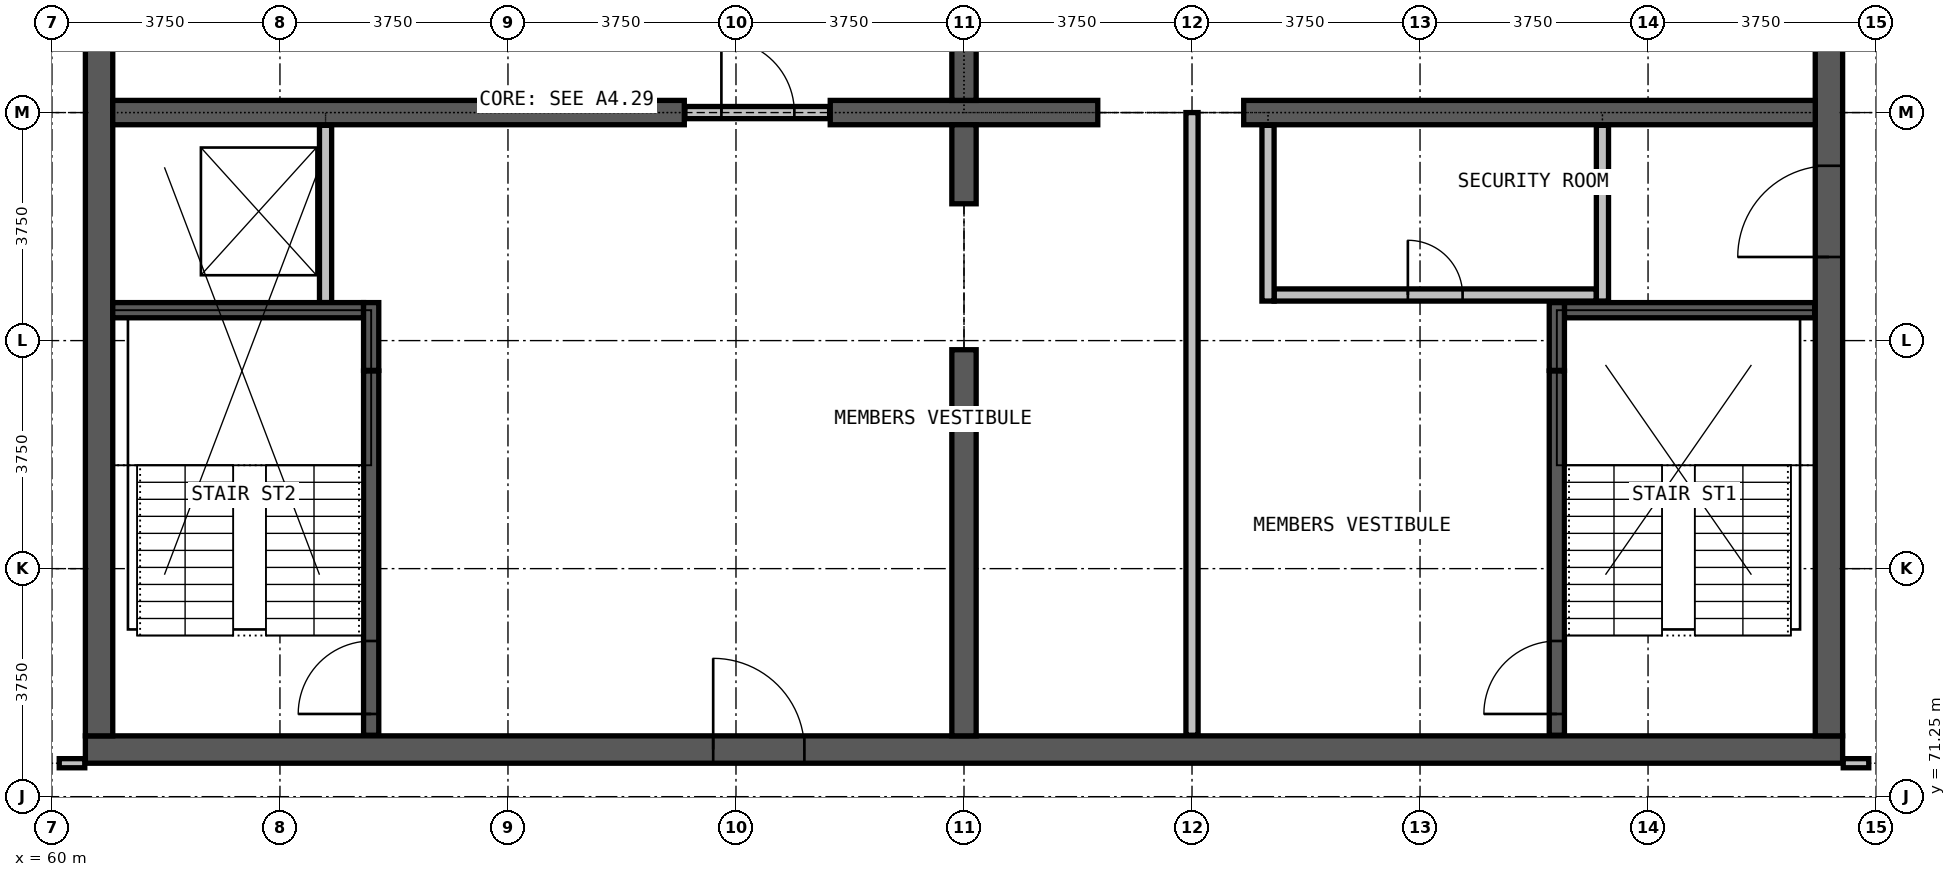
"""IFC4 building model, lengths in metres.
Left out: names, types, materials, properties, quantities, classifications, styles, units other than length and angle.
Written with IfcOpenShell. Run it as: python <this file> out.ifc"""

import sys

from ifc_helpers import new_model, si_unit, direction, frame, frame_2d, origin, place, context, subcontext, project, spatial, rectangle, extrude, element, fill, save


model = new_model("IFC4")
c1 = context("Model", 3, precision=1e-05, world=origin(), true_north=direction((0.0, 1.0)))
c2 = subcontext(c1, "Body", "Model", "MODEL_VIEW")
j1 = project(units=[si_unit("LENGTHUNIT", "METRE"), si_unit("PLANEANGLEUNIT", "RADIAN")], contexts=[c1])
p1 = place(None, origin())
s1 = spatial("IfcSite", under=j1, at=p1, CompositionType="ELEMENT")
p2 = place(p1, origin())
s2 = spatial("IfcBuilding", under=s1, at=p2, CompositionType="ELEMENT")
p3 = place(p2, frame((0.0, 0.0, 272.9)))
s3 = spatial("IfcBuildingStorey", under=s2, at=p3, CompositionType="ELEMENT", Elevation=272.9)
p4 = place(p3, frame((60.55, 72.025, 0.0), z_axis=(0.0, 0.0, 1.0), x_axis=(1.0, 0.0, 0.0)))
e1 = element("IfcWall", 1, at=p4, inside=s3, PredefinedType="SHEAR", context=c2, shape_type="SweptSolid", body=[
    extrude(rectangle(XDim=28.9, YDim=0.45, at=frame_2d((14.45, 0.0))), origin(), (0.0, 0.0, 1.0), 3.6),
])
p5 = place(p4, frame((10.325, 0.0, 0.0)))
e2 = element("IfcOpeningElement", 2, at=p5, cuts=e1, PredefinedType="OPENING", context=c2, shape_type="SweptSolid", body=[
    extrude(rectangle(XDim=1.5, YDim=2.2, at=frame_2d((0.75, 1.1))), frame((0.0, 0.235, 0.0), z_axis=(0.0, -1.0, 0.0), x_axis=(1.0, 0.0, 0.0)), (0.0, 0.0, 1.0), 0.47),
])
p6 = place(p3, frame((89.225, 72.25, 0.0), z_axis=(0.0, 0.0, 1.0), x_axis=(0.0, 1.0, 0.0)))
e3 = element("IfcWall", 3, at=p6, inside=s3, PredefinedType="SHEAR", context=c2, shape_type="SweptSolid", body=[
    extrude(rectangle(XDim=20.5, YDim=0.45, at=frame_2d((10.25, 0.0))), origin(), (0.0, 0.0, 1.0), 3.6),
])
p7 = place(p6, frame((7.875, 0.0, 0.0)))
e4 = element("IfcOpeningElement", 4, at=p7, cuts=e3, PredefinedType="OPENING", context=c2, shape_type="SweptSolid", body=[
    extrude(rectangle(XDim=1.5, YDim=2.2, at=frame_2d((0.75, 1.1))), frame((0.0, 0.235, 0.0), z_axis=(0.0, -1.0, 0.0), x_axis=(1.0, 0.0, 0.0)), (0.0, 0.0, 1.0), 0.47),
])
p8 = place(p3, frame((60.775, 92.75, 0.0), z_axis=(0.0, 0.0, 1.0), x_axis=(0.0, -1.0, 0.0)))
e5 = element("IfcWall", 5, at=p8, inside=s3, PredefinedType="SHEAR", context=c2, shape_type="SweptSolid", body=[
    extrude(rectangle(XDim=20.5, YDim=0.45, at=frame_2d((10.25, 0.0))), origin(), (0.0, 0.0, 1.0), 3.6),
])
p9 = place(p8, frame((8.025, 0.0, 0.0)))
e6 = element("IfcOpeningElement", 6, at=p9, cuts=e5, PredefinedType="OPENING", context=c2, shape_type="SweptSolid", body=[
    extrude(rectangle(XDim=1.2, YDim=2.2, at=frame_2d((0.6, 1.1))), frame((0.0, 0.235, 0.0), z_axis=(0.0, -1.0, 0.0), x_axis=(1.0, 0.0, 0.0)), (0.0, 0.0, 1.0), 0.47),
])
p10 = place(p3, frame((61.0, 82.5, 0.0), z_axis=(0.0, 0.0, 1.0), x_axis=(1.0, 0.0, 0.0)))
e7 = element("IfcWall", 7, at=p10, inside=s3, PredefinedType="SHEAR", context=c2, shape_type="SweptSolid", body=[
    extrude(rectangle(XDim=9.4, YDim=0.4, at=frame_2d((4.7, 0.0))), origin(), (0.0, 0.0, 1.0), 3.6),
])
p11 = place(p3, frame((72.8, 82.5, 0.0), z_axis=(0.0, 0.0, 1.0), x_axis=(1.0, 0.0, 0.0)))
e8 = element("IfcWall", 8, at=p11, inside=s3, PredefinedType="SHEAR", context=c2, shape_type="SweptSolid", body=[
    extrude(rectangle(XDim=4.4, YDim=0.4, at=frame_2d((2.2, 0.0))), origin(), (0.0, 0.0, 1.0), 3.6),
])
p12 = place(p3, frame((79.6, 82.5, 0.0), z_axis=(0.0, 0.0, 1.0), x_axis=(1.0, 0.0, 0.0)))
e9 = element("IfcWall", 9, at=p12, inside=s3, PredefinedType="SHEAR", context=c2, shape_type="SweptSolid", body=[
    extrude(rectangle(XDim=9.4, YDim=0.4, at=frame_2d((4.7, 0.0))), origin(), (0.0, 0.0, 1.0), 3.6),
])
p13 = place(p3, frame((75.0, 72.25, 0.0), z_axis=(0.0, 0.0, 1.0), x_axis=(0.0, 1.0, 0.0)))
e10 = element("IfcWall", 10, at=p13, inside=s3, PredefinedType="SHEAR", context=c2, shape_type="SweptSolid", body=[
    extrude(rectangle(XDim=6.35, YDim=0.4, at=frame_2d((3.175, 0.0))), origin(), (0.0, 0.0, 1.0), 3.6),
])
for number, where, z_axis, x_axis in (
    (11, (75.0, 81.0, 0.0), (0.0, 0.0, 1.0), (0.0, 1.0, 0.0)),
    (12, (75.0, 82.7, 0.0), (0.0, 0.0, 1.0), (0.0, 1.0, 0.0)),
):
    element("IfcWall", number, at=place(p3, frame(where, z_axis=z_axis, x_axis=x_axis)), inside=s3, PredefinedType="SHEAR", context=c2, shape_type="SweptSolid", body=[
        extrude(rectangle(XDim=1.3, YDim=0.4, at=frame_2d((0.65, 0.0))), origin(), (0.0, 0.0, 1.0), 3.6),
    ])
p14 = place(p3, frame((80.1, 79.5, 0.0), z_axis=(0.0, 0.0, 1.0), x_axis=(1.0, 0.0, 0.0)))
e13 = element("IfcWall", 13, at=p14, inside=s3, PredefinedType="PARTITIONING", context=c2, shape_type="SweptSolid", body=[
    extrude(rectangle(XDim=5.3, YDim=0.2, at=frame_2d((2.65, 0.0))), origin(), (0.0, 0.0, 1.0), 3.3),
])
p15 = place(p14, frame((2.2, 0.0, 0.0)))
e14 = element("IfcOpeningElement", 14, at=p15, cuts=e13, PredefinedType="OPENING", context=c2, shape_type="SweptSolid", body=[
    extrude(rectangle(XDim=0.9, YDim=2.2, at=frame_2d((0.45, 1.1))), frame((0.0, 0.11, 0.0), z_axis=(0.0, -1.0, 0.0), x_axis=(1.0, 0.0, 0.0)), (0.0, 0.0, 1.0), 0.22),
])
p16 = place(p3, frame((70.41, 82.5, 0.0), z_axis=(0.0, 0.0, 1.0), x_axis=(1.0, 0.0, 0.0)))
e15 = element("IfcWall", 15, at=p16, inside=s3, PredefinedType="PARTITIONING", context=c2, shape_type="SweptSolid", body=[
    extrude(rectangle(XDim=2.38, YDim=0.2, at=frame_2d((1.19, 0.0))), origin(), (0.0, 0.0, 1.0), 2.4),
])
p17 = place(p16, frame((0.6, 0.0, 0.0)))
e16 = element("IfcOpeningElement", 16, at=p17, cuts=e15, PredefinedType="OPENING", context=c2, shape_type="SweptSolid", body=[
    extrude(rectangle(XDim=1.2, YDim=2.2, at=frame_2d((0.6, 1.1))), frame((0.0, 0.11, 0.0), z_axis=(0.0, -1.0, 0.0), x_axis=(1.0, 0.0, 0.0)), (0.0, 0.0, 1.0), 0.22),
])
p18 = place(p3, frame((78.75, 72.26, 0.0), z_axis=(0.0, 0.0, 1.0), x_axis=(0.0, 1.0, 0.0)))
e17 = element("IfcWall", 17, at=p18, inside=s3, PredefinedType="PARTITIONING", context=c2, shape_type="SweptSolid", body=[
    extrude(rectangle(XDim=10.24, YDim=0.2, at=frame_2d((5.12, 0.0))), origin(), (0.0, 0.0, 1.0), 3.3),
])
for number, where, z_axis, x_axis in (
    (18, (80.0, 79.4, 0.0), (0.0, 0.0, 1.0), (0.0, 1.0, 0.0)),
    (19, (85.5, 79.4, 0.0), (0.0, 0.0, 1.0), (0.0, 1.0, 0.0)),
):
    element("IfcWall", number, at=place(p3, frame(where, z_axis=z_axis, x_axis=x_axis)), inside=s3, PredefinedType="PARTITIONING", context=c2, shape_type="SweptSolid", body=[
        extrude(rectangle(XDim=2.89, YDim=0.2, at=frame_2d((1.445, 0.0))), origin(), (0.0, 0.0, 1.0), 3.3),
    ])
for number, where, z_axis, x_axis in (
    (20, (60.12, 71.8, 0.0), (0.0, 0.0, 1.0), (1.0, 0.0, 0.0)),
    (21, (89.46, 71.8, 0.0), (0.0, 0.0, 1.0), (1.0, 0.0, 0.0)),
):
    element("IfcWall", number, at=place(p3, frame(where, z_axis=z_axis, x_axis=x_axis)), inside=s3, PredefinedType="PARTITIONING", context=c2, shape_type="SweptSolid", body=[
        extrude(rectangle(XDim=0.42, YDim=0.15, at=frame_2d((0.21, 0.0))), origin(), (0.0, 0.0, 1.0), 3.3),
    ])
p19 = place(p3, frame((64.5, 79.375, 0.0), z_axis=(0.0, 0.0, 1.0), x_axis=(0.0, 1.0, 0.0)))
e22 = element("IfcWall", 22, at=p19, inside=s3, PredefinedType="PARTITIONING", context=c2, shape_type="SweptSolid", body=[
    extrude(rectangle(XDim=2.915, YDim=0.2, at=frame_2d((1.458, 0.0))), origin(), (0.0, 0.0, 1.0), 3.3),
])
p20 = place(p3, frame((61.0, 79.25, 0.0), z_axis=(0.0, 0.0, 1.0), x_axis=(1.0, 0.0, 0.0)))
e23 = element("IfcWall", 23, at=p20, inside=s3, PredefinedType="PARTITIONING", context=c2, shape_type="SweptSolid", body=[
    extrude(rectangle(XDim=4.125, YDim=0.25, at=frame_2d((2.062, 0.0))), origin(), (0.0, 0.0, 1.0), 3.3),
])
p21 = place(p3, frame((84.875, 79.25, 0.0), z_axis=(0.0, 0.0, 1.0), x_axis=(1.0, 0.0, 0.0)))
e24 = element("IfcWall", 24, at=p21, inside=s3, PredefinedType="PARTITIONING", context=c2, shape_type="SweptSolid", body=[
    extrude(rectangle(XDim=4.115, YDim=0.25, at=frame_2d((2.058, 0.0))), origin(), (0.0, 0.0, 1.0), 3.3),
])
p22 = place(p3, frame((65.25, 72.26, 0.0), z_axis=(0.0, 0.0, 1.0), x_axis=(0.0, 1.0, 0.0)))
e25 = element("IfcWall", 25, at=p22, inside=s3, PredefinedType="PARTITIONING", context=c2, shape_type="SweptSolid", body=[
    extrude(rectangle(XDim=5.99, YDim=0.25, at=frame_2d((2.995, 0.0))), origin(), (0.0, 0.0, 1.0), 3.3),
])
p23 = place(p22, frame((0.35, 0.0, 0.0)))
e26 = element("IfcOpeningElement", 26, at=p23, cuts=e25, PredefinedType="OPENING", context=c2, shape_type="SweptSolid", body=[
    extrude(rectangle(XDim=1.2, YDim=2.2, at=frame_2d((0.6, 1.1))), frame((0.0, 0.135, 0.0), z_axis=(0.0, -1.0, 0.0), x_axis=(1.0, 0.0, 0.0)), (0.0, 0.0, 1.0), 0.27),
])
p24 = place(p3, frame((65.25, 78.26, 0.0), z_axis=(0.0, 0.0, 1.0), x_axis=(0.0, 1.0, 0.0)))
e27 = element("IfcWall", 27, at=p24, inside=s3, PredefinedType="PARTITIONING", context=c2, shape_type="SweptSolid", body=[
    extrude(rectangle(XDim=1.115, YDim=0.25, at=frame_2d((0.558, 0.0))), origin(), (0.0, 0.0, 1.0), 3.3),
])
p25 = place(p3, frame((84.75, 72.26, 0.0), z_axis=(0.0, 0.0, 1.0), x_axis=(0.0, 1.0, 0.0)))
e28 = element("IfcWall", 28, at=p25, inside=s3, PredefinedType="PARTITIONING", context=c2, shape_type="SweptSolid", body=[
    extrude(rectangle(XDim=5.99, YDim=0.25, at=frame_2d((2.995, 0.0))), origin(), (0.0, 0.0, 1.0), 3.3),
])
p26 = place(p25, frame((0.35, 0.0, 0.0)))
e29 = element("IfcOpeningElement", 29, at=p26, cuts=e28, PredefinedType="OPENING", context=c2, shape_type="SweptSolid", body=[
    extrude(rectangle(XDim=1.2, YDim=2.2, at=frame_2d((0.6, 1.1))), frame((0.0, 0.135, 0.0), z_axis=(0.0, -1.0, 0.0), x_axis=(1.0, 0.0, 0.0)), (0.0, 0.0, 1.0), 0.27),
])
p27 = place(p3, frame((84.75, 78.26, 0.0), z_axis=(0.0, 0.0, 1.0), x_axis=(0.0, 1.0, 0.0)))
e30 = element("IfcWall", 30, at=p27, inside=s3, PredefinedType="PARTITIONING", context=c2, shape_type="SweptSolid", body=[
    extrude(rectangle(XDim=1.115, YDim=0.25, at=frame_2d((0.558, 0.0))), origin(), (0.0, 0.0, 1.0), 3.3),
])
p28 = place(p17, origin())
e31 = element("IfcDoor", 31, at=p28, inside=s3, OperationType="SINGLE_SWING_LEFT", PredefinedType="DOOR", context=c2, shape_type="SweptSolid", body=[
    extrude(rectangle(XDim=1.2, YDim=2.2, at=frame_2d((0.6, 1.1))), frame((0.0, 0.025, 0.0), z_axis=(0.0, -1.0, 0.0), x_axis=(1.0, 0.0, 0.0)), (0.0, 0.0, 1.0), 0.05),
])
fill(e16, e31)
p29 = place(p23, origin())
e32 = element("IfcDoor", 32, at=p29, inside=s3, OperationType="SINGLE_SWING_RIGHT", PredefinedType="DOOR", context=c2, shape_type="SweptSolid", body=[
    extrude(rectangle(XDim=1.2, YDim=2.2, at=frame_2d((0.6, 1.1))), frame((0.0, 0.025, 0.0), z_axis=(0.0, -1.0, 0.0), x_axis=(1.0, 0.0, 0.0)), (0.0, 0.0, 1.0), 0.05),
])
fill(e26, e32)
p30 = place(p26, origin())
e33 = element("IfcDoor", 33, at=p30, inside=s3, OperationType="SINGLE_SWING_LEFT", PredefinedType="DOOR", context=c2, shape_type="SweptSolid", body=[
    extrude(rectangle(XDim=1.2, YDim=2.2, at=frame_2d((0.6, 1.1))), frame((0.0, 0.025, 0.0), z_axis=(0.0, -1.0, 0.0), x_axis=(1.0, 0.0, 0.0)), (0.0, 0.0, 1.0), 0.05),
])
fill(e29, e33)
p31 = place(p5, origin())
e34 = element("IfcDoor", 34, at=p31, inside=s3, OperationType="DOUBLE_DOOR_SINGLE_SWING", PredefinedType="DOOR", context=c2, shape_type="SweptSolid", body=[
    extrude(rectangle(XDim=1.5, YDim=2.2, at=frame_2d((0.75, 1.1))), frame((0.0, 0.025, 0.0), z_axis=(0.0, -1.0, 0.0), x_axis=(1.0, 0.0, 0.0)), (0.0, 0.0, 1.0), 0.05),
])
fill(e2, e34)
p32 = place(p7, origin())
e35 = element("IfcDoor", 35, at=p32, inside=s3, OperationType="DOUBLE_DOOR_SINGLE_SWING", PredefinedType="DOOR", context=c2, shape_type="SweptSolid", body=[
    extrude(rectangle(XDim=1.5, YDim=2.2, at=frame_2d((0.75, 1.1))), frame((0.0, 0.025, 0.0), z_axis=(0.0, -1.0, 0.0), x_axis=(1.0, 0.0, 0.0)), (0.0, 0.0, 1.0), 0.05),
])
fill(e4, e35)
p33 = place(p15, origin())
e36 = element("IfcDoor", 36, at=p33, inside=s3, OperationType="SINGLE_SWING_LEFT", PredefinedType="DOOR", context=c2, shape_type="SweptSolid", body=[
    extrude(rectangle(XDim=0.9, YDim=2.2, at=frame_2d((0.45, 1.1))), frame((0.0, 0.025, 0.0), z_axis=(0.0, -1.0, 0.0), x_axis=(1.0, 0.0, 0.0)), (0.0, 0.0, 1.0), 0.05),
])
fill(e14, e36)
save(model, sys.argv[1])
